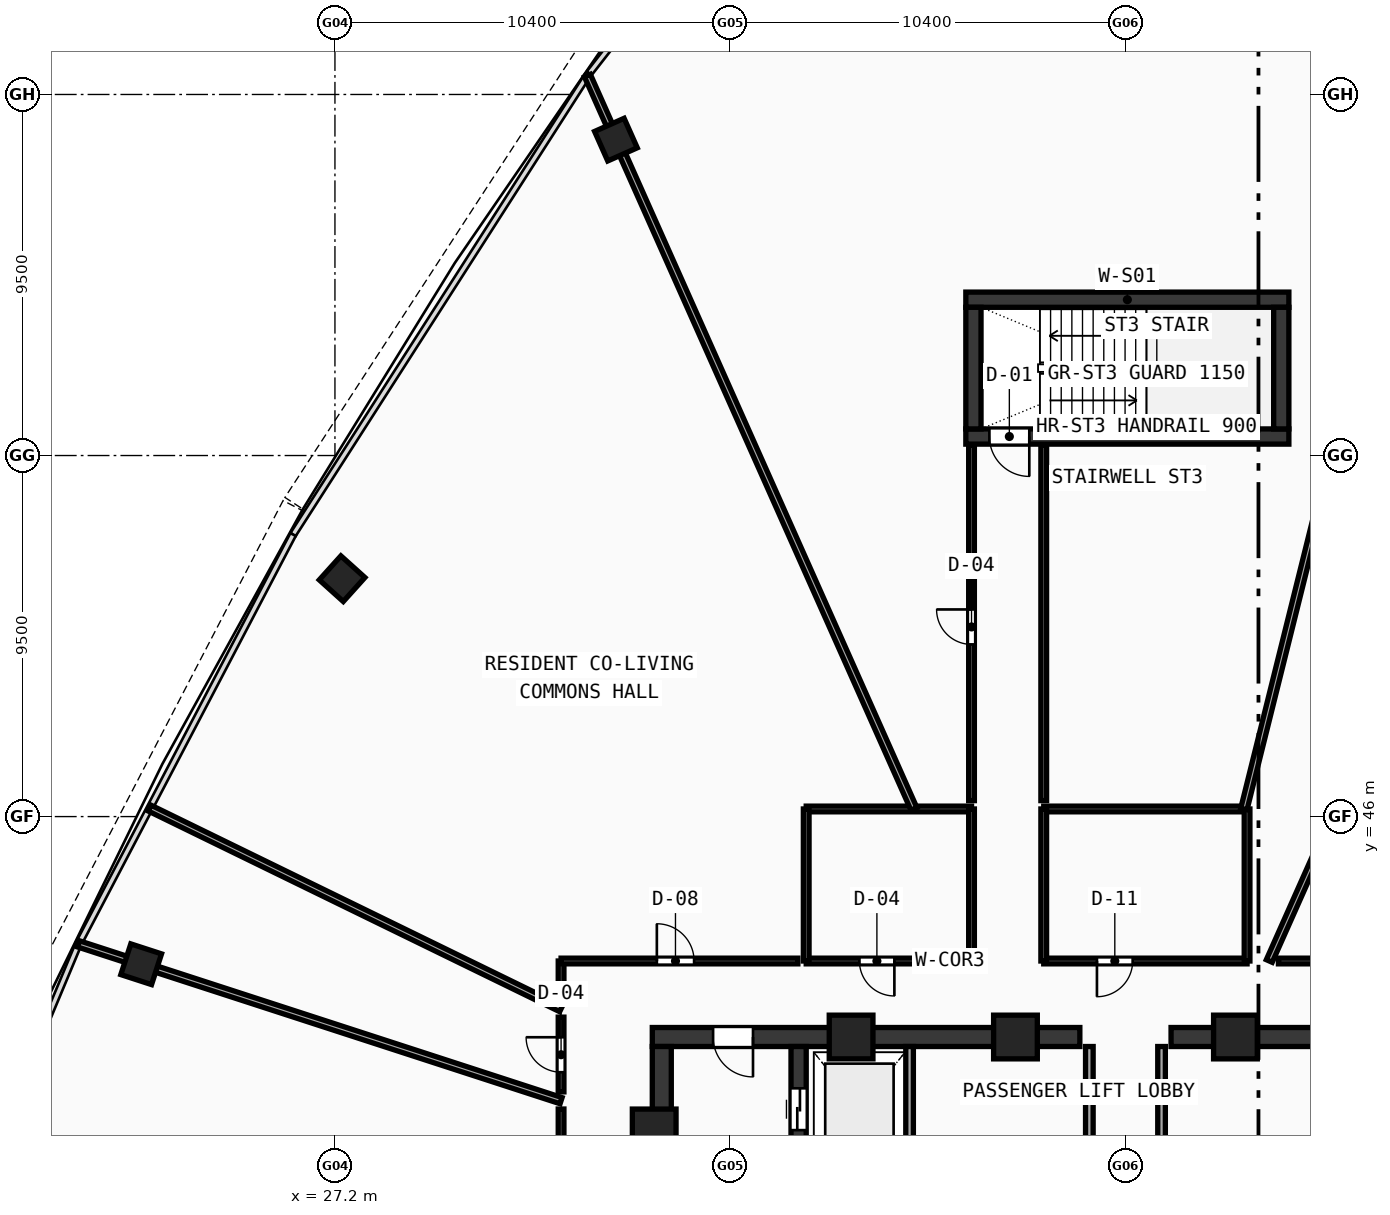
"""IFC4 building model, lengths in metres.
Left out: names, types, materials, properties, quantities, classifications, styles, units other than length and angle.
Written with IfcOpenShell. Run it as: python <this file> out.ifc"""

import sys

from ifc_helpers import new_model, si_unit, direction, frame, frame_2d, origin, origin_with_axes, origin_2d, place, context, subcontext, project, spatial, rectangle, hollow_rectangle, extrude, source, transform, mapped, element, fill, save


model = new_model("IFC4")
c1 = context("Model", 3, precision=1e-05, world=origin(), true_north=direction((0.0, 1.0)))
c2 = subcontext(c1, "Body", "Model", "MODEL_VIEW")
j1 = project(units=[si_unit("LENGTHUNIT", "METRE"), si_unit("PLANEANGLEUNIT", "RADIAN")], contexts=[c1])
p1 = place(None, origin())
s1 = spatial("IfcSite", under=j1, at=p1, CompositionType="ELEMENT")
p2 = place(p1, origin())
s2 = spatial("IfcBuilding", under=s1, at=p2, CompositionType="ELEMENT")
p3 = place(p2, frame((0.0, 0.0, 259.45)))
s3 = spatial("IfcBuildingStorey", under=s2, at=p3, CompositionType="ELEMENT", Elevation=259.45)
p4 = place(p3, frame((35.55, 40.2, 0.0), z_axis=(0.0, 0.0, 1.0), x_axis=(1.0, 0.0, 0.0)))
e1 = element("IfcWall", 1, at=p4, inside=s3, PredefinedType="SHEAR", context=c2, shape_type="SweptSolid", body=[
    extrude(rectangle(XDim=11.25, YDim=0.5, at=frame_2d((5.625, 0.0))), origin(), (0.0, 0.0, 1.0), 3.47),
])
p5 = place(p4, frame((1.6, 0.0, 0.0)))
e2 = element("IfcOpeningElement", 2, at=p5, cuts=e1, PredefinedType="OPENING", context=c2, shape_type="SweptSolid", body=[
    extrude(rectangle(XDim=1.05, YDim=2.1, at=frame_2d((0.525, 1.05))), frame((0.0, 0.26, 0.0), z_axis=(0.0, -1.0, 0.0), x_axis=(1.0, 0.0, 0.0)), (0.0, 0.0, 1.0), 0.52),
])
p6 = place(p3, frame((49.2, 40.2, 0.0), z_axis=(0.0, 0.0, 1.0), x_axis=(1.0, 0.0, 0.0)))
e3 = element("IfcWall", 3, at=p6, inside=s3, PredefinedType="SHEAR", context=c2, shape_type="SweptSolid", body=[
    extrude(rectangle(XDim=11.25, YDim=0.5, at=frame_2d((5.625, 0.0))), origin(), (0.0, 0.0, 1.0), 3.47),
])
p7 = place(p6, frame((8.6, 0.0, 0.0)))
e4 = element("IfcOpeningElement", 4, at=p7, cuts=e3, PredefinedType="OPENING", context=c2, shape_type="SweptSolid", body=[
    extrude(rectangle(XDim=1.05, YDim=2.1, at=frame_2d((0.525, 1.05))), frame((0.0, 0.26, 0.0), z_axis=(0.0, -1.0, 0.0), x_axis=(1.0, 0.0, 0.0)), (0.0, 0.0, 1.0), 0.52),
])
p8 = place(p3, frame((35.8, 27.75, 0.0), z_axis=(0.0, 0.0, 1.0), x_axis=(0.0, 1.0, 0.0)))
e5 = element("IfcWall", 5, at=p8, inside=s3, PredefinedType="SHEAR", context=c2, shape_type="SweptSolid", body=[
    extrude(rectangle(XDim=12.2, YDim=0.5, at=frame_2d((6.1, 0.0))), origin(), (0.0, 0.0, 1.0), 3.47),
])
p9 = place(p3, frame((39.4, 27.75, 0.0), z_axis=(0.0, 0.0, 1.0), x_axis=(0.0, 1.0, 0.0)))
e6 = element("IfcWall", 6, at=p9, inside=s3, PredefinedType="SHEAR", context=c2, shape_type="SweptSolid", body=[
    extrude(rectangle(XDim=12.2, YDim=0.4, at=frame_2d((6.1, 0.0))), origin(), (0.0, 0.0, 1.0), 3.47),
])
p10 = place(p9, frame((10.0, 0.0, 0.0)))
e7 = element("IfcOpeningElement", 7, at=p10, cuts=e6, PredefinedType="OPENING", context=c2, shape_type="SweptSolid", body=[
    extrude(rectangle(XDim=1.1, YDim=2.1, at=frame_2d((0.55, 1.05))), frame((0.0, 0.21, 0.0), z_axis=(0.0, -1.0, 0.0), x_axis=(1.0, 0.0, 0.0)), (0.0, 0.0, 1.0), 0.42),
])
p11 = place(p3, frame((43.8, 59.6, 0.0), z_axis=(0.0, 0.0, 1.0), x_axis=(1.0, 0.0, 0.0)))
e8 = element("IfcWall", 8, at=p11, inside=s3, PredefinedType="SHEAR", context=c2, shape_type="SweptSolid", body=[
    extrude(rectangle(XDim=8.5, YDim=0.4, at=frame_2d((4.25, 0.0))), origin(), (0.0, 0.0, 1.0), 3.47),
])
p12 = place(p3, frame((43.8, 56.0, 0.0), z_axis=(0.0, 0.0, 1.0), x_axis=(1.0, 0.0, 0.0)))
e9 = element("IfcWall", 9, at=p12, inside=s3, PredefinedType="SHEAR", context=c2, shape_type="SweptSolid", body=[
    extrude(rectangle(XDim=8.5, YDim=0.4, at=frame_2d((4.25, 0.0))), origin(), (0.0, 0.0, 1.0), 3.47),
])
p13 = place(p12, frame((0.62, 0.0, 0.0)))
e10 = element("IfcOpeningElement", 10, at=p13, cuts=e9, PredefinedType="OPENING", context=c2, shape_type="SweptSolid", body=[
    extrude(rectangle(XDim=1.05, YDim=2.1, at=frame_2d((0.525, 1.05))), frame((0.0, 0.21, 0.0), z_axis=(0.0, -1.0, 0.0), x_axis=(1.0, 0.0, 0.0)), (0.0, 0.0, 1.0), 0.42),
])
for number, where, z_axis, x_axis in (
    (11, (44.0, 56.2, 0.0), (0.0, 0.0, 1.0), (0.0, 1.0, 0.0)),
    (12, (52.1, 56.2, 0.0), (0.0, 0.0, 1.0), (0.0, 1.0, 0.0)),
):
    element("IfcWall", number, at=place(p3, frame(where, z_axis=z_axis, x_axis=x_axis)), inside=s3, PredefinedType="SHEAR", context=c2, shape_type="SweptSolid", body=[
        extrude(rectangle(XDim=3.2, YDim=0.4, at=frame_2d((1.6, 0.0))), origin(), (0.0, 0.0, 1.0), 3.47),
    ])
m1 = source(origin(), c2, "Body", "SweptSolid", [
    extrude(hollow_rectangle(XDim=1.15, YDim=1.15, WallThickness=0.048, at=origin_2d()), origin(), (0.0, 0.0, 1.0), 3.73),
])
for number, where, z_axis, x_axis in (
    (13, (50.894, 40.2, -0.26), (0.0, 0.0, 1.0), (1.0, 0.0, 0.0)),
    (14, (45.106, 40.2, -0.26), (0.0, 0.0, 1.0), (1.0, 0.0, 0.0)),
    (15, (40.781, 40.2, -0.26), (0.0, 0.0, 1.0), (1.0, 0.0, 0.0)),
    (16, (35.6, 37.729, -0.26), (0.0, 0.0, 1.0), (1.0, 0.0, 0.0)),
):
    element("IfcColumn", number, at=place(p3, frame(where, z_axis=z_axis, x_axis=x_axis)), inside=s3, PredefinedType="COLUMN", context=c2, shape_type="MappedRepresentation", body=[
        mapped(m1, transform((0.0, 0.0, 0.0), scale=1.0)),
    ])
m2 = source(origin(), c2, "Body", "SweptSolid", [
    extrude(hollow_rectangle(XDim=0.85, YDim=0.85, WallThickness=0.034, at=origin_2d()), origin(), (0.0, 0.0, 1.0), 3.73),
])
for number, where, z_axis, x_axis in (
    (17, (34.593, 63.812, -0.26), (0.0, 0.0, 1.0), (-0.914, -0.407, 0.0)),
    (18, (27.388, 52.259, -0.26), (0.0, 0.0, 1.0), (-0.669, -0.743, 0.0)),
    (19, (22.102, 42.115, -0.26), (0.0, 0.0, 1.0), (-0.309, -0.951, 0.0)),
):
    element("IfcColumn", number, at=place(p3, frame(where, z_axis=z_axis, x_axis=x_axis)), inside=s3, PredefinedType="COLUMN", context=c2, shape_type="MappedRepresentation", body=[
        mapped(m2, transform((0.0, 0.0, 0.0), scale=1.0)),
    ])
p14 = place(p3, frame((42.32, 33.5, 0.0), z_axis=(0.0, 0.0, 1.0), x_axis=(0.0, 1.0, 0.0)))
e20 = element("IfcWall", 20, at=p14, inside=s3, PredefinedType="SOLIDWALL", context=c2, shape_type="SweptSolid", body=[
    extrude(rectangle(XDim=6.45, YDim=0.2, at=frame_2d((3.225, 0.0))), origin(), (0.0, 0.0, 1.0), 3.47),
])
p15 = place(p14, frame((1.0, 0.0, 0.0)))
e21 = element("IfcOpeningElement", 21, at=p15, cuts=e20, PredefinedType="OPENING", context=c2, shape_type="SweptSolid", body=[
    extrude(rectangle(XDim=1.05, YDim=2.1, at=frame_2d((0.525, 1.05))), frame((0.0, 0.11, 0.0), z_axis=(0.0, -1.0, 0.0), x_axis=(1.0, 0.0, 0.0)), (0.0, 0.0, 1.0), 0.22),
])
for number, where, z_axis, x_axis in (
    (22, (47.05, 37.32, 0.0), (0.0, 0.0, 1.0), (0.0, 1.0, 0.0)),
    (23, (48.95, 37.32, 0.0), (0.0, 0.0, 1.0), (0.0, 1.0, 0.0)),
):
    element("IfcWall", number, at=place(p3, frame(where, z_axis=z_axis, x_axis=x_axis)), inside=s3, PredefinedType="SOLIDWALL", context=c2, shape_type="SweptSolid", body=[
        extrude(rectangle(XDim=2.63, YDim=0.2, at=frame_2d((1.315, 0.0))), origin(), (0.0, 0.0, 1.0), 3.47),
    ])
p16 = place(p3, frame((39.6, 42.2, 0.0), z_axis=(0.0, 0.0, 1.0), x_axis=(1.0, 0.0, 0.0)))
e24 = element("IfcWall", 24, at=p16, inside=s3, PredefinedType="PARTITIONING", context=c2, shape_type="SweptSolid", body=[
    extrude(rectangle(XDim=4.35, YDim=0.15, at=frame_2d((2.175, 0.0))), origin(), (0.0, 0.0, 1.0), 3.47),
])
p17 = place(p16, frame((1.4, 0.0, 0.0)))
e25 = element("IfcOpeningElement", 25, at=p17, cuts=e24, PredefinedType="OPENING", context=c2, shape_type="SweptSolid", body=[
    extrude(rectangle(XDim=0.92, YDim=2.1, at=frame_2d((0.46, 1.05))), frame((0.0, 0.085, 0.0), z_axis=(0.0, -1.0, 0.0), x_axis=(1.0, 0.0, 0.0)), (0.0, 0.0, 1.0), 0.17),
])
p18 = place(p3, frame((39.6, 46.2, 0.0), z_axis=(0.0, 0.0, 1.0), x_axis=(1.0, 0.0, 0.0)))
e26 = element("IfcWall", 26, at=p18, inside=s3, PredefinedType="PARTITIONING", context=c2, shape_type="SweptSolid", body=[
    extrude(rectangle(XDim=4.35, YDim=0.15, at=frame_2d((2.175, 0.0))), origin(), (0.0, 0.0, 1.0), 2.82),
])
p19 = place(p3, frame((39.6, 42.2, 0.0), z_axis=(0.0, 0.0, 1.0), x_axis=(0.0, 1.0, 0.0)))
e27 = element("IfcWall", 27, at=p19, inside=s3, PredefinedType="PARTITIONING", context=c2, shape_type="SweptSolid", body=[
    extrude(rectangle(XDim=4.0, YDim=0.15, at=frame_2d((2.0, 0.0))), origin(), (0.0, 0.0, 1.0), 3.47),
])
p20 = place(p3, frame((43.95, 42.2, 0.0), z_axis=(0.0, 0.0, 1.0), x_axis=(0.0, 1.0, 0.0)))
e28 = element("IfcWall", 28, at=p20, inside=s3, PredefinedType="PARTITIONING", context=c2, shape_type="SweptSolid", body=[
    extrude(rectangle(XDim=4.0, YDim=0.15, at=frame_2d((2.0, 0.0))), origin(), (0.0, 0.0, 1.0), 2.82),
])
p21 = place(p3, frame((45.85, 42.2, 0.0), z_axis=(0.0, 0.0, 1.0), x_axis=(1.0, 0.0, 0.0)))
e29 = element("IfcWall", 29, at=p21, inside=s3, PredefinedType="PARTITIONING", context=c2, shape_type="SweptSolid", body=[
    extrude(rectangle(XDim=5.35, YDim=0.15, at=frame_2d((2.675, 0.0))), origin(), (0.0, 0.0, 1.0), 3.47),
])
p22 = place(p21, frame((1.4, 0.0, 0.0)))
e30 = element("IfcOpeningElement", 30, at=p22, cuts=e29, PredefinedType="OPENING", context=c2, shape_type="SweptSolid", body=[
    extrude(rectangle(XDim=0.94, YDim=2.1, at=frame_2d((0.47, 1.05))), frame((0.0, 0.085, 0.0), z_axis=(0.0, -1.0, 0.0), x_axis=(1.0, 0.0, 0.0)), (0.0, 0.0, 1.0), 0.17),
])
p23 = place(p3, frame((45.85, 46.2, 0.0), z_axis=(0.0, 0.0, 1.0), x_axis=(1.0, 0.0, 0.0)))
e31 = element("IfcWall", 31, at=p23, inside=s3, PredefinedType="PARTITIONING", context=c2, shape_type="SweptSolid", body=[
    extrude(rectangle(XDim=5.35, YDim=0.15, at=frame_2d((2.675, 0.0))), origin(), (0.0, 0.0, 1.0), 3.47),
])
for number, where, z_axis, x_axis in (
    (32, (45.85, 42.2, 0.0), (0.0, 0.0, 1.0), (0.0, 1.0, 0.0)),
    (33, (51.2, 42.2, 0.0), (0.0, 0.0, 1.0), (0.0, 1.0, 0.0)),
):
    element("IfcWall", number, at=place(p3, frame(where, z_axis=z_axis, x_axis=x_axis)), inside=s3, PredefinedType="PARTITIONING", context=c2, shape_type="SweptSolid", body=[
        extrude(rectangle(XDim=4.0, YDim=0.15, at=frame_2d((2.0, 0.0))), origin(), (0.0, 0.0, 1.0), 3.47),
    ])
p24 = place(p3, frame((51.784, 42.2, 0.0), z_axis=(0.0, 0.0, 1.0), x_axis=(0.406736188948, 0.913545659833, 0.0)))
e34 = element("IfcWall", 34, at=p24, inside=s3, PredefinedType="PARTITIONING", context=c2, shape_type="SweptSolid", body=[
    extrude(rectangle(XDim=25.501, YDim=0.17, at=frame_2d((12.75, 0.0))), origin(), (0.0, 0.0, 1.0), 2.82),
])
p25 = place(p3, frame((51.117, 46.2, 0.0), z_axis=(0.0, 0.0, 1.0), x_axis=(0.241915360039, 0.970297355751, 0.0)))
e35 = element("IfcWall", 35, at=p25, inside=s3, PredefinedType="PARTITIONING", context=c2, shape_type="SweptSolid", body=[
    extrude(rectangle(XDim=26.119, YDim=0.17, at=frame_2d((13.06, 0.0))), origin(), (0.0, 0.0, 1.0), 2.82),
])
p26 = place(p3, frame((42.435, 46.2, 0.0), z_axis=(0.0, 0.0, 1.0), x_axis=(-0.406732494706, 0.913547304605, 0.0)))
e36 = element("IfcWall", 36, at=p26, inside=s3, PredefinedType="PARTITIONING", context=c2, shape_type="SweptSolid", body=[
    extrude(rectangle(XDim=21.123, YDim=0.17, at=frame_2d((10.562, 0.0))), origin(), (0.0, 0.0, 1.0), 2.82),
])
p27 = place(p3, frame((33.15, 40.943, 0.0), z_axis=(0.0, 0.0, 1.0), x_axis=(-0.89879494126, 0.438369311842, 0.0)))
e37 = element("IfcWall", 37, at=p27, inside=s3, PredefinedType="PARTITIONING", context=c2, shape_type="SweptSolid", body=[
    extrude(rectangle(XDim=12.043, YDim=0.17, at=frame_2d((6.021, 0.0))), origin(), (0.0, 0.0, 1.0), 2.82),
])
p28 = place(p3, frame((33.15, 38.525, 0.0), z_axis=(0.0, 0.0, 1.0), x_axis=(-0.951055435747, 0.30902031994, 0.0)))
e38 = element("IfcWall", 38, at=p28, inside=s3, PredefinedType="PARTITIONING", context=c2, shape_type="SweptSolid", body=[
    extrude(rectangle(XDim=13.349, YDim=0.17, at=frame_2d((6.675, 0.0))), origin(), (0.0, 0.0, 1.0), 2.82),
])
p29 = place(p3, frame((33.15, 31.301, 0.0), z_axis=(0.0, 0.0, 1.0), x_axis=(0.0, 1.0, 0.0)))
e39 = element("IfcWall", 39, at=p29, inside=s3, PredefinedType="PARTITIONING", context=c2, shape_type="SweptSolid", body=[
    extrude(rectangle(XDim=7.004, YDim=0.15, at=frame_2d((3.502, 0.0))), origin(), (0.0, 0.0, 1.0), 3.47),
])
p30 = place(p29, frame((3.027, 0.0, 0.0)))
e40 = element("IfcOpeningElement", 40, at=p30, cuts=e39, PredefinedType="OPENING", context=c2, shape_type="SweptSolid", body=[
    extrude(rectangle(XDim=0.98, YDim=2.12, at=frame_2d((0.49, 1.06))), frame((0.0, 0.085, 0.0), z_axis=(0.0, -1.0, 0.0), x_axis=(1.0, 0.0, 0.0)), (0.0, 0.0, 1.0), 0.17),
])
p31 = place(p3, frame((33.15, 38.756, 0.0), z_axis=(0.0, 0.0, 1.0), x_axis=(0.0, 1.0, 0.0)))
e41 = element("IfcWall", 41, at=p31, inside=s3, PredefinedType="PARTITIONING", context=c2, shape_type="SweptSolid", body=[
    extrude(rectangle(XDim=1.967, YDim=0.15, at=frame_2d((0.983, 0.0))), origin(), (0.0, 0.0, 1.0), 3.47),
])
p32 = place(p31, frame((0.518, 0.0, 0.0)))
e42 = element("IfcOpeningElement", 42, at=p32, cuts=e41, PredefinedType="OPENING", context=c2, shape_type="SweptSolid", body=[
    extrude(rectangle(XDim=0.92, YDim=2.1, at=frame_2d((0.46, 1.05))), frame((0.0, 0.085, 0.0), z_axis=(0.0, -1.0, 0.0), x_axis=(1.0, 0.0, 0.0)), (0.0, 0.0, 1.0), 0.17),
])
p33 = place(p3, frame((33.15, 41.188, 0.0), z_axis=(0.0, 0.0, 1.0), x_axis=(0.0, 1.0, 0.0)))
e43 = element("IfcWall", 43, at=p33, inside=s3, PredefinedType="PARTITIONING", context=c2, shape_type="SweptSolid", body=[
    extrude(rectangle(XDim=1.012, YDim=0.15, at=frame_2d((0.506, 0.0))), origin(), (0.0, 0.0, 1.0), 3.12),
])
p34 = place(p3, frame((33.15, 42.2, 0.0), z_axis=(0.0, 0.0, 1.0), x_axis=(1.0, 0.0, 0.0)))
e44 = element("IfcWall", 44, at=p34, inside=s3, PredefinedType="PARTITIONING", context=c2, shape_type="SweptSolid", body=[
    extrude(rectangle(XDim=6.23, YDim=0.15, at=frame_2d((3.115, 0.0))), origin(), (0.0, 0.0, 1.0), 2.82),
])
p35 = place(p34, frame((2.52, 0.0, 0.0)))
e45 = element("IfcOpeningElement", 45, at=p35, cuts=e44, PredefinedType="OPENING", context=c2, shape_type="SweptSolid", body=[
    extrude(rectangle(XDim=0.98, YDim=2.12, at=frame_2d((0.49, 1.06))), frame((0.0, 0.085, 0.0), z_axis=(0.0, -1.0, 0.0), x_axis=(1.0, 0.0, 0.0)), (0.0, 0.0, 1.0), 0.17),
])
p36 = place(p3, frame((43.95, 46.42, 0.0), z_axis=(0.0, 0.0, 1.0), x_axis=(0.0, 1.0, 0.0)))
e46 = element("IfcWall", 46, at=p36, inside=s3, PredefinedType="PARTITIONING", context=c2, shape_type="SweptSolid", body=[
    extrude(rectangle(XDim=9.36, YDim=0.15, at=frame_2d((4.68, 0.0))), origin(), (0.0, 0.0, 1.0), 3.12),
])
p37 = place(p36, frame((4.11, 0.0, 0.0)))
e47 = element("IfcOpeningElement", 47, at=p37, cuts=e46, PredefinedType="OPENING", context=c2, shape_type="SweptSolid", body=[
    extrude(rectangle(XDim=0.92, YDim=2.1, at=frame_2d((0.46, 1.05))), frame((0.0, 0.085, 0.0), z_axis=(0.0, -1.0, 0.0), x_axis=(1.0, 0.0, 0.0)), (0.0, 0.0, 1.0), 0.17),
])
p38 = place(p3, frame((45.85, 55.78, 0.0), z_axis=(0.0, 0.0, 1.0), x_axis=(0.0, -1.0, 0.0)))
e48 = element("IfcWall", 48, at=p38, inside=s3, PredefinedType="PARTITIONING", context=c2, shape_type="SweptSolid", body=[
    extrude(rectangle(XDim=9.36, YDim=0.15, at=frame_2d((4.68, 0.0))), origin(), (0.0, 0.0, 1.0), 3.12),
])
p39 = place(p3, frame((52.025, 42.2, 0.0), z_axis=(0.0, 0.0, 1.0), x_axis=(1.0, 0.0, 0.0)))
e49 = element("IfcWall", 49, at=p39, inside=s3, PredefinedType="PARTITIONING", context=c2, shape_type="SweptSolid", body=[
    extrude(rectangle(XDim=10.825, YDim=0.15, at=frame_2d((5.413, 0.0))), origin(), (0.0, 0.0, 1.0), 2.82),
])
p40 = place(p39, frame((5.047, 0.0, 0.0)))
e50 = element("IfcOpeningElement", 50, at=p40, cuts=e49, PredefinedType="OPENING", context=c2, shape_type="SweptSolid", body=[
    extrude(rectangle(XDim=0.98, YDim=2.12, at=frame_2d((0.49, 1.06))), frame((0.0, 0.085, 0.0), z_axis=(0.0, -1.0, 0.0), x_axis=(1.0, 0.0, 0.0)), (0.0, 0.0, 1.0), 0.17),
])
m3 = source(origin(), c2, "Body", "SweptSolid", [
    extrude(rectangle(XDim=1.05, YDim=2.1, at=frame_2d((0.525, 1.05))), frame((0.0, 0.025, 0.0), z_axis=(0.0, -1.0, 0.0), x_axis=(1.0, 0.0, 0.0)), (0.0, 0.0, 1.0), 0.05),
])
p41 = place(p5, frame((1.05, 0.0, 0.0), z_axis=(0.0, 0.0, 1.0), x_axis=(-1.0, 0.0, 0.0)))
e51 = element("IfcDoor", 51, at=p41, inside=s3, OperationType="SINGLE_SWING_LEFT", PredefinedType="DOOR", context=c2, shape_type="MappedRepresentation", body=[
    mapped(m3, transform((0.0, 0.0, 0.0), scale=1.0)),
])
fill(e2, e51)
m4 = source(origin(), c2, "Body", "SweptSolid", [
    extrude(rectangle(XDim=1.1, YDim=2.1, at=frame_2d((0.55, 1.05))), frame((0.0, 0.025, 0.0), z_axis=(0.0, -1.0, 0.0), x_axis=(1.0, 0.0, 0.0)), (0.0, 0.0, 1.0), 0.05),
])
p42 = place(p10, frame((1.1, 0.0, 0.0), z_axis=(0.0, 0.0, 1.0), x_axis=(-1.0, 0.0, 0.0)))
e52 = element("IfcDoor", 52, at=p42, inside=s3, OperationType="DOUBLE_DOOR_SLIDING", PredefinedType="DOOR", context=c2, shape_type="MappedRepresentation", body=[
    mapped(m4, transform((0.0, 0.0, 0.0), scale=1.0)),
])
fill(e7, e52)
p43 = place(p13, frame((1.05, 0.0, 0.0), z_axis=(0.0, 0.0, 1.0), x_axis=(-1.0, 0.0, 0.0)))
e53 = element("IfcDoor", 53, at=p43, inside=s3, OperationType="SINGLE_SWING_LEFT", PredefinedType="DOOR", context=c2, shape_type="MappedRepresentation", body=[
    mapped(m3, transform((0.0, 0.0, 0.0), scale=1.0)),
])
fill(e10, e53)
m5 = source(origin(), c2, "Body", "SweptSolid", [
    extrude(rectangle(XDim=0.92, YDim=2.1, at=frame_2d((0.46, 1.05))), frame((0.0, 0.025, 0.0), z_axis=(0.0, -1.0, 0.0), x_axis=(1.0, 0.0, 0.0)), (0.0, 0.0, 1.0), 0.05),
])
p44 = place(p17, frame((0.92, 0.0, 0.0), z_axis=(0.0, 0.0, 1.0), x_axis=(-1.0, 0.0, 0.0)))
e54 = element("IfcDoor", 54, at=p44, inside=s3, OperationType="SINGLE_SWING_LEFT", PredefinedType="DOOR", context=c2, shape_type="MappedRepresentation", body=[
    mapped(m5, transform((0.0, 0.0, 0.0), scale=1.0)),
])
fill(e25, e54)
m6 = source(origin(), c2, "Body", "SweptSolid", [
    extrude(rectangle(XDim=0.94, YDim=2.1, at=frame_2d((0.47, 1.05))), frame((0.0, 0.025, 0.0), z_axis=(0.0, -1.0, 0.0), x_axis=(1.0, 0.0, 0.0)), (0.0, 0.0, 1.0), 0.05),
])
p45 = place(p22, frame((0.94, 0.0, 0.0), z_axis=(0.0, 0.0, 1.0), x_axis=(-1.0, 0.0, 0.0)))
e55 = element("IfcDoor", 55, at=p45, inside=s3, OperationType="SINGLE_SWING_RIGHT", PredefinedType="DOOR", context=c2, shape_type="MappedRepresentation", body=[
    mapped(m6, transform((0.0, 0.0, 0.0), scale=1.0)),
])
fill(e30, e55)
p46 = place(p37, origin_with_axes())
e56 = element("IfcDoor", 56, at=p46, inside=s3, OperationType="SINGLE_SWING_RIGHT", PredefinedType="DOOR", context=c2, shape_type="MappedRepresentation", body=[
    mapped(m5, transform((0.0, 0.0, 0.0), scale=1.0)),
])
fill(e47, e56)
m7 = source(origin(), c2, "Body", "SweptSolid", [
    extrude(rectangle(XDim=0.98, YDim=2.12, at=frame_2d((0.49, 1.06))), frame((0.0, 0.025, 0.0), z_axis=(0.0, -1.0, 0.0), x_axis=(1.0, 0.0, 0.0)), (0.0, 0.0, 1.0), 0.05),
])
p47 = place(p35, origin_with_axes())
e57 = element("IfcDoor", 57, at=p47, inside=s3, OperationType="SINGLE_SWING_LEFT", PredefinedType="DOOR", context=c2, shape_type="MappedRepresentation", body=[
    mapped(m7, transform((0.0, 0.0, 0.0), scale=1.0)),
])
fill(e45, e57)
p48 = place(p32, origin_with_axes())
e58 = element("IfcDoor", 58, at=p48, inside=s3, OperationType="SINGLE_SWING_RIGHT", PredefinedType="DOOR", context=c2, shape_type="MappedRepresentation", body=[
    mapped(m5, transform((0.0, 0.0, 0.0), scale=1.0)),
])
fill(e42, e58)
save(model, sys.argv[1])
